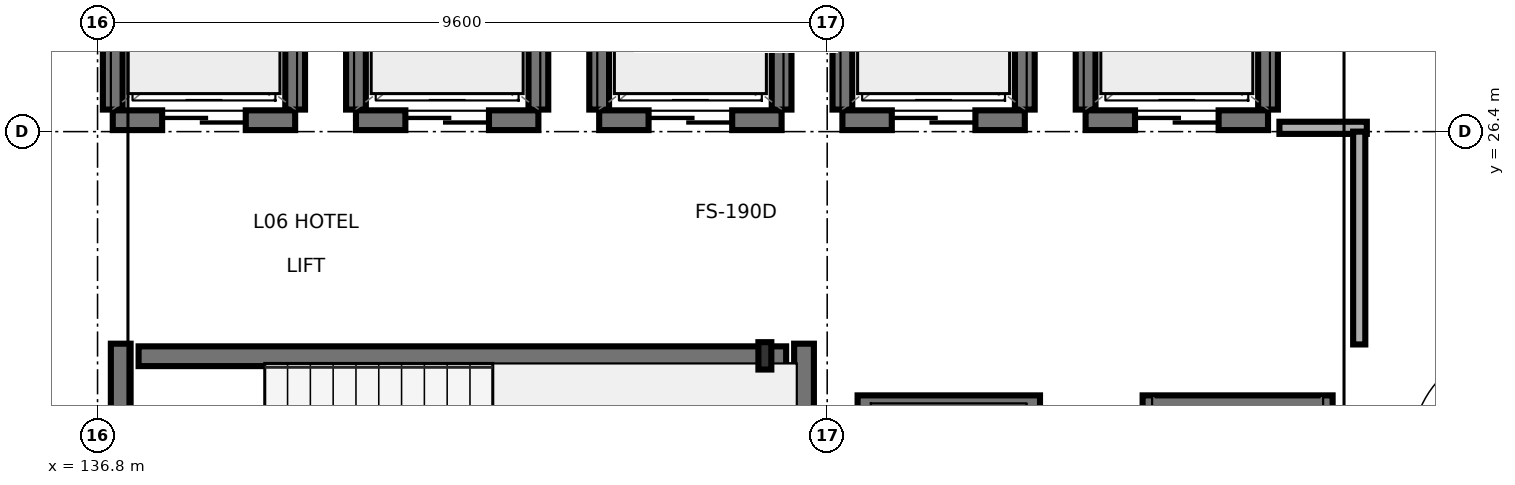
"""IFC4 building model, lengths in metres.
Left out: names, types, materials, properties, quantities, classifications, styles, units other than length and angle.
Written with IfcOpenShell. Run it as: python <this file> out.ifc"""

import sys

from ifc_helpers import new_model, si_unit, direction, frame, frame_2d, origin, origin_2d, place, context, subcontext, project, spatial, rectangle, i_section, extrude, element, fill, save


model = new_model("IFC4")
c1 = context("Model", 3, precision=1e-05, world=origin(), true_north=direction((0.0, 1.0)))
c2 = subcontext(c1, "Body", "Model", "MODEL_VIEW")
j1 = project(units=[si_unit("LENGTHUNIT", "METRE"), si_unit("PLANEANGLEUNIT", "RADIAN")], contexts=[c1])
p1 = place(None, origin())
s1 = spatial("IfcSite", under=j1, at=p1, CompositionType="ELEMENT")
p2 = place(p1, origin())
s2 = spatial("IfcBuilding", under=s1, at=p2, CompositionType="ELEMENT")
p3 = place(p2, frame((0.0, 0.0, 21.5)))
s3 = spatial("IfcBuildingStorey", under=s2, at=p3, CompositionType="ELEMENT", Elevation=21.5)
p4 = place(p3, frame((145.58, 23.45, 0.0), z_axis=(0.0, 0.0, 1.0), x_axis=(1.0, 0.0, 0.0)))
e1 = element("IfcColumn", 1, at=p4, inside=s3, PredefinedType="PILASTER", context=c2, shape_type="SweptSolid", body=[
    extrude(i_section(OverallWidth=0.17, OverallDepth=0.36, WebThickness=0.008, FlangeThickness=0.013, FilletRadius=0.018, at=origin_2d()), origin(), (0.0, 0.0, 1.0), 3.4),
])
p5 = place(p3, frame((137.105, 19.34, 0.0), z_axis=(0.0, 0.0, 1.0), x_axis=(0.0, 1.0, 0.0)))
e2 = element("IfcWall", 2, at=p5, inside=s3, PredefinedType="SHEAR", context=c2, shape_type="SweptSolid", body=[
    extrude(rectangle(XDim=4.27, YDim=0.26, at=frame_2d((2.135, 0.0))), origin(), (0.0, 0.0, 1.0), 3.195),
])
p6 = place(p5, frame((0.61, 0.0, 0.0)))
e3 = element("IfcOpeningElement", 3, at=p6, cuts=e2, PredefinedType="OPENING", context=c2, shape_type="SweptSolid", body=[
    extrude(rectangle(XDim=1.1, YDim=2.2, at=frame_2d((0.55, 1.1))), frame((0.0, 0.14, 0.0), z_axis=(0.0, -1.0, 0.0), x_axis=(1.0, 0.0, 0.0)), (0.0, 0.0, 1.0), 0.28),
])
p7 = place(p3, frame((146.095, 19.34, 0.0), z_axis=(0.0, 0.0, 1.0), x_axis=(0.0, 1.0, 0.0)))
e4 = element("IfcWall", 4, at=p7, inside=s3, PredefinedType="SHEAR", context=c2, shape_type="SweptSolid", body=[
    extrude(rectangle(XDim=4.27, YDim=0.26, at=frame_2d((2.135, 0.0))), origin(), (0.0, 0.0, 1.0), 3.195),
])
p8 = place(p3, frame((137.34, 23.445, 0.0), z_axis=(0.0, 0.0, 1.0), x_axis=(1.0, 0.0, 0.0)))
e5 = element("IfcWall", 5, at=p8, inside=s3, PredefinedType="SHEAR", context=c2, shape_type="SweptSolid", body=[
    extrude(rectangle(XDim=8.52, YDim=0.26, at=frame_2d((4.26, 0.0))), origin(), (0.0, 0.0, 1.0), 3.195),
])
p9 = place(p3, frame((137.0, 26.55, 0.0), z_axis=(0.0, 0.0, 1.0), x_axis=(1.0, 0.0, 0.0)))
e6 = element("IfcWall", 6, at=p9, inside=s3, PredefinedType="SHEAR", context=c2, shape_type="SweptSolid", body=[
    extrude(rectangle(XDim=2.4, YDim=0.26, at=frame_2d((1.2, 0.0))), origin(), (0.0, 0.0, 1.0), 2.73),
])
p10 = place(p9, frame((0.65, 0.0, 0.0)))
e7 = element("IfcOpeningElement", 7, at=p10, cuts=e6, PredefinedType="OPENING", context=c2, shape_type="SweptSolid", body=[
    extrude(rectangle(XDim=1.1, YDim=2.2, at=frame_2d((0.55, 1.1))), frame((0.0, 0.14, 0.0), z_axis=(0.0, -1.0, 0.0), x_axis=(1.0, 0.0, 0.0)), (0.0, 0.0, 1.0), 0.28),
])
for number, where, z_axis, x_axis in (
    (8, (137.0, 26.69, 0.0), (0.0, 0.0, 1.0), (0.0, 1.0, 0.0)),
    (9, (139.4, 26.69, 0.0), (0.0, 0.0, 1.0), (0.0, 1.0, 0.0)),
):
    element("IfcWall", number, at=place(p3, frame(where, z_axis=z_axis, x_axis=x_axis)), inside=s3, PredefinedType="SHEAR", context=c2, shape_type="SweptSolid", body=[
        extrude(rectangle(XDim=1.82, YDim=0.26, at=frame_2d((0.91, 0.0))), origin(), (0.0, 0.0, 1.0), 2.73),
    ])
p11 = place(p3, frame((140.2, 26.55, 0.0), z_axis=(0.0, 0.0, 1.0), x_axis=(1.0, 0.0, 0.0)))
e10 = element("IfcWall", 10, at=p11, inside=s3, PredefinedType="SHEAR", context=c2, shape_type="SweptSolid", body=[
    extrude(rectangle(XDim=2.4, YDim=0.26, at=frame_2d((1.2, 0.0))), origin(), (0.0, 0.0, 1.0), 3.195),
])
p12 = place(p11, frame((0.65, 0.0, 0.0)))
e11 = element("IfcOpeningElement", 11, at=p12, cuts=e10, PredefinedType="OPENING", context=c2, shape_type="SweptSolid", body=[
    extrude(rectangle(XDim=1.1, YDim=2.2, at=frame_2d((0.55, 1.1))), frame((0.0, 0.14, 0.0), z_axis=(0.0, -1.0, 0.0), x_axis=(1.0, 0.0, 0.0)), (0.0, 0.0, 1.0), 0.28),
])
for number, where, z_axis, x_axis in (
    (12, (140.2, 26.69, 0.0), (0.0, 0.0, 1.0), (0.0, 1.0, 0.0)),
    (13, (142.6, 26.69, 0.0), (0.0, 0.0, 1.0), (0.0, 1.0, 0.0)),
):
    element("IfcWall", number, at=place(p3, frame(where, z_axis=z_axis, x_axis=x_axis)), inside=s3, PredefinedType="SHEAR", context=c2, shape_type="SweptSolid", body=[
        extrude(rectangle(XDim=1.82, YDim=0.26, at=frame_2d((0.91, 0.0))), origin(), (0.0, 0.0, 1.0), 3.195),
    ])
p13 = place(p3, frame((143.4, 26.55, 0.0), z_axis=(0.0, 0.0, 1.0), x_axis=(1.0, 0.0, 0.0)))
e14 = element("IfcWall", 14, at=p13, inside=s3, PredefinedType="SHEAR", context=c2, shape_type="SweptSolid", body=[
    extrude(rectangle(XDim=2.4, YDim=0.26, at=frame_2d((1.2, 0.0))), origin(), (0.0, 0.0, 1.0), 3.195),
])
p14 = place(p13, frame((0.65, 0.0, 0.0)))
e15 = element("IfcOpeningElement", 15, at=p14, cuts=e14, PredefinedType="OPENING", context=c2, shape_type="SweptSolid", body=[
    extrude(rectangle(XDim=1.1, YDim=2.2, at=frame_2d((0.55, 1.1))), frame((0.0, 0.14, 0.0), z_axis=(0.0, -1.0, 0.0), x_axis=(1.0, 0.0, 0.0)), (0.0, 0.0, 1.0), 0.28),
])
for number, where, z_axis, x_axis in (
    (16, (143.4, 26.69, 0.0), (0.0, 0.0, 1.0), (0.0, 1.0, 0.0)),
    (17, (145.8, 26.69, 0.0), (0.0, 0.0, 1.0), (0.0, 1.0, 0.0)),
):
    element("IfcWall", number, at=place(p3, frame(where, z_axis=z_axis, x_axis=x_axis)), inside=s3, PredefinedType="SHEAR", context=c2, shape_type="SweptSolid", body=[
        extrude(rectangle(XDim=1.82, YDim=0.26, at=frame_2d((0.91, 0.0))), origin(), (0.0, 0.0, 1.0), 3.195),
    ])
p15 = place(p3, frame((146.6, 26.55, 0.0), z_axis=(0.0, 0.0, 1.0), x_axis=(1.0, 0.0, 0.0)))
e18 = element("IfcWall", 18, at=p15, inside=s3, PredefinedType="SHEAR", context=c2, shape_type="SweptSolid", body=[
    extrude(rectangle(XDim=2.4, YDim=0.26, at=frame_2d((1.2, 0.0))), origin(), (0.0, 0.0, 1.0), 3.195),
])
p16 = place(p15, frame((0.65, 0.0, 0.0)))
e19 = element("IfcOpeningElement", 19, at=p16, cuts=e18, PredefinedType="OPENING", context=c2, shape_type="SweptSolid", body=[
    extrude(rectangle(XDim=1.1, YDim=2.2, at=frame_2d((0.55, 1.1))), frame((0.0, 0.14, 0.0), z_axis=(0.0, -1.0, 0.0), x_axis=(1.0, 0.0, 0.0)), (0.0, 0.0, 1.0), 0.28),
])
for number, where, z_axis, x_axis in (
    (20, (146.6, 26.69, 0.0), (0.0, 0.0, 1.0), (0.0, 1.0, 0.0)),
    (21, (149.0, 26.69, 0.0), (0.0, 0.0, 1.0), (0.0, 1.0, 0.0)),
):
    element("IfcWall", number, at=place(p3, frame(where, z_axis=z_axis, x_axis=x_axis)), inside=s3, PredefinedType="SHEAR", context=c2, shape_type="SweptSolid", body=[
        extrude(rectangle(XDim=1.82, YDim=0.26, at=frame_2d((0.91, 0.0))), origin(), (0.0, 0.0, 1.0), 3.195),
    ])
p17 = place(p3, frame((149.8, 26.55, 0.0), z_axis=(0.0, 0.0, 1.0), x_axis=(1.0, 0.0, 0.0)))
e22 = element("IfcWall", 22, at=p17, inside=s3, PredefinedType="SHEAR", context=c2, shape_type="SweptSolid", body=[
    extrude(rectangle(XDim=2.4, YDim=0.26, at=frame_2d((1.2, 0.0))), origin(), (0.0, 0.0, 1.0), 3.195),
])
p18 = place(p17, frame((0.65, 0.0, 0.0)))
e23 = element("IfcOpeningElement", 23, at=p18, cuts=e22, PredefinedType="OPENING", context=c2, shape_type="SweptSolid", body=[
    extrude(rectangle(XDim=1.1, YDim=2.2, at=frame_2d((0.55, 1.1))), frame((0.0, 0.14, 0.0), z_axis=(0.0, -1.0, 0.0), x_axis=(1.0, 0.0, 0.0)), (0.0, 0.0, 1.0), 0.28),
])
for number, where, z_axis, x_axis in (
    (24, (149.8, 26.69, 0.0), (0.0, 0.0, 1.0), (0.0, 1.0, 0.0)),
    (25, (152.2, 26.69, 0.0), (0.0, 0.0, 1.0), (0.0, 1.0, 0.0)),
):
    element("IfcWall", number, at=place(p3, frame(where, z_axis=z_axis, x_axis=x_axis)), inside=s3, PredefinedType="SHEAR", context=c2, shape_type="SweptSolid", body=[
        extrude(rectangle(XDim=1.82, YDim=0.26, at=frame_2d((0.91, 0.0))), origin(), (0.0, 0.0, 1.0), 3.195),
    ])
p19 = place(p3, frame((146.8, 22.8, 0.0), z_axis=(0.0, 0.0, 1.0), x_axis=(1.0, 0.0, 0.0)))
e26 = element("IfcWall", 26, at=p19, inside=s3, PredefinedType="SHEAR", context=c2, shape_type="SweptSolid", body=[
    extrude(rectangle(XDim=2.4, YDim=0.26, at=frame_2d((1.2, 0.0))), origin(), (0.0, 0.0, 1.0), 3.195),
])
p20 = place(p3, frame((150.55, 22.8, 0.0), z_axis=(0.0, 0.0, 1.0), x_axis=(1.0, 0.0, 0.0)))
e27 = element("IfcWall", 27, at=p20, inside=s3, PredefinedType="SHEAR", context=c2, shape_type="SweptSolid", body=[
    extrude(rectangle(XDim=2.5, YDim=0.26, at=frame_2d((1.25, 0.0))), origin(), (0.0, 0.0, 1.0), 3.195),
])
p21 = place(p3, frame((152.35, 26.45, 0.0), z_axis=(0.0, 0.0, 1.0), x_axis=(1.0, 0.0, 0.0)))
e28 = element("IfcWall", 28, at=p21, inside=s3, PredefinedType="PARTITIONING", context=c2, shape_type="SweptSolid", body=[
    extrude(rectangle(XDim=1.15, YDim=0.16, at=frame_2d((0.575, 0.0))), origin(), (0.0, 0.0, 1.0), 3.195),
])
p22 = place(p3, frame((153.4, 23.6, 0.0), z_axis=(0.0, 0.0, 1.0), x_axis=(0.0, 1.0, 0.0)))
e29 = element("IfcWall", 29, at=p22, inside=s3, PredefinedType="PARTITIONING", context=c2, shape_type="SweptSolid", body=[
    extrude(rectangle(XDim=2.8, YDim=0.16, at=frame_2d((1.4, 0.0))), origin(), (0.0, 0.0, 1.0), 3.195),
])
p23 = place(p10, origin())
e30 = element("IfcDoor", 30, at=p23, inside=s3, OperationType="SLIDING_TO_LEFT", PredefinedType="DOOR", context=c2, shape_type="SweptSolid", body=[
    extrude(rectangle(XDim=1.1, YDim=2.2, at=frame_2d((0.55, 1.1))), frame((0.0, 0.025, 0.0), z_axis=(0.0, -1.0, 0.0), x_axis=(1.0, 0.0, 0.0)), (0.0, 0.0, 1.0), 0.05),
])
fill(e7, e30)
p24 = place(p12, origin())
e31 = element("IfcDoor", 31, at=p24, inside=s3, OperationType="SLIDING_TO_RIGHT", PredefinedType="DOOR", context=c2, shape_type="SweptSolid", body=[
    extrude(rectangle(XDim=1.1, YDim=2.2, at=frame_2d((0.55, 1.1))), frame((0.0, 0.025, 0.0), z_axis=(0.0, -1.0, 0.0), x_axis=(1.0, 0.0, 0.0)), (0.0, 0.0, 1.0), 0.05),
])
fill(e11, e31)
p25 = place(p14, origin())
e32 = element("IfcDoor", 32, at=p25, inside=s3, OperationType="SLIDING_TO_LEFT", PredefinedType="DOOR", context=c2, shape_type="SweptSolid", body=[
    extrude(rectangle(XDim=1.1, YDim=2.2, at=frame_2d((0.55, 1.1))), frame((0.0, 0.025, 0.0), z_axis=(0.0, -1.0, 0.0), x_axis=(1.0, 0.0, 0.0)), (0.0, 0.0, 1.0), 0.05),
])
fill(e15, e32)
p26 = place(p16, origin())
e33 = element("IfcDoor", 33, at=p26, inside=s3, OperationType="SLIDING_TO_RIGHT", PredefinedType="DOOR", context=c2, shape_type="SweptSolid", body=[
    extrude(rectangle(XDim=1.1, YDim=2.2, at=frame_2d((0.55, 1.1))), frame((0.0, 0.025, 0.0), z_axis=(0.0, -1.0, 0.0), x_axis=(1.0, 0.0, 0.0)), (0.0, 0.0, 1.0), 0.05),
])
fill(e19, e33)
p27 = place(p18, origin())
e34 = element("IfcDoor", 34, at=p27, inside=s3, OperationType="SLIDING_TO_LEFT", PredefinedType="DOOR", context=c2, shape_type="SweptSolid", body=[
    extrude(rectangle(XDim=1.1, YDim=2.2, at=frame_2d((0.55, 1.1))), frame((0.0, 0.025, 0.0), z_axis=(0.0, -1.0, 0.0), x_axis=(1.0, 0.0, 0.0)), (0.0, 0.0, 1.0), 0.05),
])
fill(e23, e34)
save(model, sys.argv[1])
